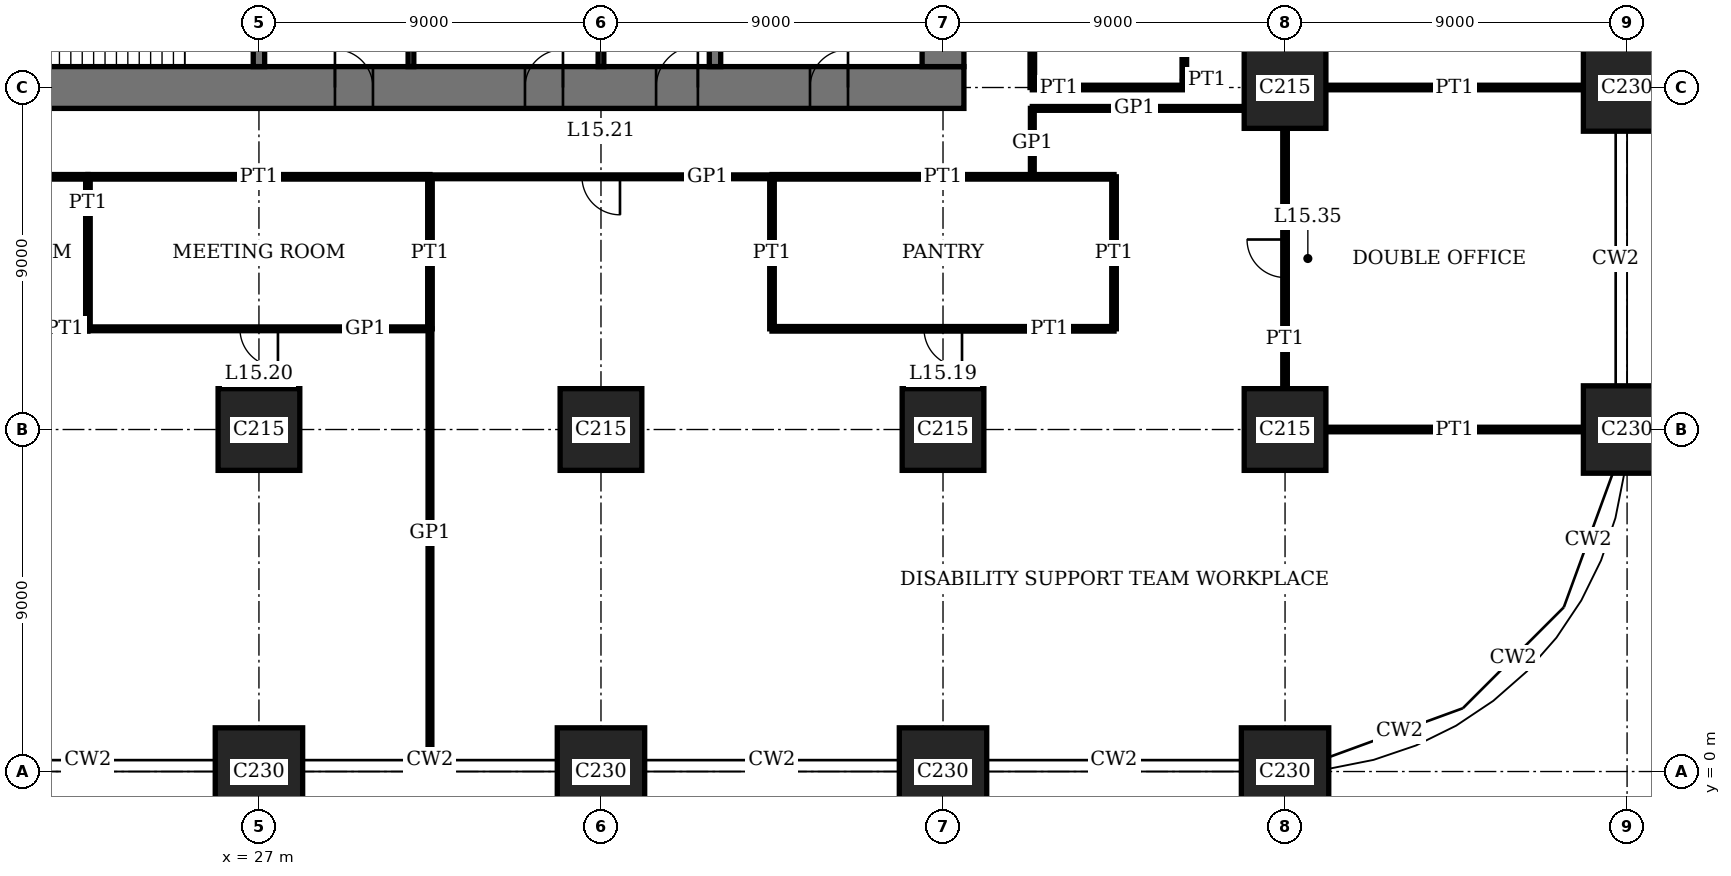
"""IFC4 building model, lengths in metres.
Left out: names, types, materials, properties, quantities, classifications, styles, units other than length and angle.
Written with IfcOpenShell. Run it as: python <this file> out.ifc"""

import sys

from ifc_helpers import new_model, si_unit, direction, frame, frame_2d, origin, origin_2d, place, context, subcontext, project, spatial, rectangle, extrude, element, fill, save


model = new_model("IFC4")
c1 = context("Model", 3, precision=1e-05, world=origin(), true_north=direction((0.0, 1.0)))
c2 = subcontext(c1, "Body", "Model", "MODEL_VIEW")
j1 = project(units=[si_unit("LENGTHUNIT", "METRE"), si_unit("PLANEANGLEUNIT", "RADIAN")], contexts=[c1])
p1 = place(None, origin())
s1 = spatial("IfcSite", under=j1, at=p1, CompositionType="ELEMENT")
p2 = place(p1, origin())
s2 = spatial("IfcBuilding", under=s1, at=p2, CompositionType="ELEMENT")
p3 = place(p2, frame((0.0, 0.0, 63.8)))
s3 = spatial("IfcBuildingStorey", under=s2, at=p3, CompositionType="ELEMENT", Elevation=63.8)
p4 = place(p3, frame((27.0, 0.0, 0.0), z_axis=(0.0, 0.0, 1.0), x_axis=(1.0, 0.0, 0.0)))
e1 = element("IfcColumn", 1, at=p4, inside=s3, PredefinedType="COLUMN", context=c2, shape_type="SweptSolid", body=[
    extrude(rectangle(XDim=2.3, YDim=2.3, at=origin_2d()), origin(), (0.0, 0.0, 1.0), 4.0),
])
p5 = place(p3, frame((27.0, 9.0, 0.0), z_axis=(0.0, 0.0, 1.0), x_axis=(1.0, 0.0, 0.0)))
e2 = element("IfcColumn", 2, at=p5, inside=s3, PredefinedType="COLUMN", context=c2, shape_type="SweptSolid", body=[
    extrude(rectangle(XDim=2.15, YDim=2.15, at=origin_2d()), origin(), (0.0, 0.0, 1.0), 4.0),
])
p6 = place(p3, frame((36.0, 0.0, 0.0), z_axis=(0.0, 0.0, 1.0), x_axis=(1.0, 0.0, 0.0)))
e3 = element("IfcColumn", 3, at=p6, inside=s3, PredefinedType="COLUMN", context=c2, shape_type="SweptSolid", body=[
    extrude(rectangle(XDim=2.3, YDim=2.3, at=origin_2d()), origin(), (0.0, 0.0, 1.0), 4.0),
])
p7 = place(p3, frame((36.0, 9.0, 0.0), z_axis=(0.0, 0.0, 1.0), x_axis=(1.0, 0.0, 0.0)))
e4 = element("IfcColumn", 4, at=p7, inside=s3, PredefinedType="COLUMN", context=c2, shape_type="SweptSolid", body=[
    extrude(rectangle(XDim=2.15, YDim=2.15, at=origin_2d()), origin(), (0.0, 0.0, 1.0), 4.0),
])
p8 = place(p3, frame((45.0, 0.0, 0.0), z_axis=(0.0, 0.0, 1.0), x_axis=(1.0, 0.0, 0.0)))
e5 = element("IfcColumn", 5, at=p8, inside=s3, PredefinedType="COLUMN", context=c2, shape_type="SweptSolid", body=[
    extrude(rectangle(XDim=2.3, YDim=2.3, at=origin_2d()), origin(), (0.0, 0.0, 1.0), 4.0),
])
p9 = place(p3, frame((45.0, 9.0, 0.0), z_axis=(0.0, 0.0, 1.0), x_axis=(1.0, 0.0, 0.0)))
e6 = element("IfcColumn", 6, at=p9, inside=s3, PredefinedType="COLUMN", context=c2, shape_type="SweptSolid", body=[
    extrude(rectangle(XDim=2.15, YDim=2.15, at=origin_2d()), origin(), (0.0, 0.0, 1.0), 4.0),
])
p10 = place(p3, frame((54.0, 0.0, 0.0), z_axis=(0.0, 0.0, 1.0), x_axis=(1.0, 0.0, 0.0)))
e7 = element("IfcColumn", 7, at=p10, inside=s3, PredefinedType="COLUMN", context=c2, shape_type="SweptSolid", body=[
    extrude(rectangle(XDim=2.3, YDim=2.3, at=origin_2d()), origin(), (0.0, 0.0, 1.0), 4.0),
])
for number, where, z_axis, x_axis in (
    (8, (54.0, 9.0, 0.0), (0.0, 0.0, 1.0), (1.0, 0.0, 0.0)),
    (9, (54.0, 18.0, 0.0), (0.0, 0.0, 1.0), (1.0, 0.0, 0.0)),
):
    element("IfcColumn", number, at=place(p3, frame(where, z_axis=z_axis, x_axis=x_axis)), inside=s3, PredefinedType="COLUMN", context=c2, shape_type="SweptSolid", body=[
        extrude(rectangle(XDim=2.15, YDim=2.15, at=origin_2d()), origin(), (0.0, 0.0, 1.0), 4.0),
    ])
for number, where, z_axis, x_axis in (
    (10, (63.0, 9.0, 0.0), (0.0, 0.0, 1.0), (1.0, 0.0, 0.0)),
    (11, (63.0, 18.0, 0.0), (0.0, 0.0, 1.0), (1.0, 0.0, 0.0)),
):
    element("IfcColumn", number, at=place(p3, frame(where, z_axis=z_axis, x_axis=x_axis)), inside=s3, PredefinedType="COLUMN", context=c2, shape_type="SweptSolid", body=[
        extrude(rectangle(XDim=2.3, YDim=2.3, at=origin_2d()), origin(), (0.0, 0.0, 1.0), 4.0),
    ])
p11 = place(p3, frame((17.45, 18.0, 0.0), z_axis=(0.0, 0.0, 1.0), x_axis=(1.0, 0.0, 0.0)))
e12 = element("IfcWall", 12, at=p11, inside=s3, PredefinedType="SHEAR", context=c2, shape_type="SweptSolid", body=[
    extrude(rectangle(XDim=28.1, YDim=1.1, at=frame_2d((14.05, 0.0))), origin(), (0.0, 0.0, 1.0), 4.0),
])
p12 = place(p11, frame((11.55, 0.0, 0.0)))
e13 = element("IfcOpeningElement", 13, at=p12, cuts=e12, PredefinedType="OPENING", context=c2, shape_type="SweptSolid", body=[
    extrude(rectangle(XDim=1.0, YDim=2.4, at=frame_2d((0.5, 1.2))), frame((0.0, 0.56, 0.0), z_axis=(0.0, -1.0, 0.0), x_axis=(1.0, 0.0, 0.0)), (0.0, 0.0, 1.0), 1.12),
])
p13 = place(p11, frame((16.55, 0.0, 0.0)))
e14 = element("IfcOpeningElement", 14, at=p13, cuts=e12, PredefinedType="OPENING", context=c2, shape_type="SweptSolid", body=[
    extrude(rectangle(XDim=1.0, YDim=2.4, at=frame_2d((0.5, 1.2))), frame((0.0, 0.56, 0.0), z_axis=(0.0, -1.0, 0.0), x_axis=(1.0, 0.0, 0.0)), (0.0, 0.0, 1.0), 1.12),
])
p14 = place(p11, frame((20.0, 0.0, 0.0)))
e15 = element("IfcOpeningElement", 15, at=p14, cuts=e12, PredefinedType="OPENING", context=c2, shape_type="SweptSolid", body=[
    extrude(rectangle(XDim=1.1, YDim=2.4, at=frame_2d((0.55, 1.2))), frame((0.0, 0.56, 0.0), z_axis=(0.0, -1.0, 0.0), x_axis=(1.0, 0.0, 0.0)), (0.0, 0.0, 1.0), 1.12),
])
p15 = place(p11, frame((24.05, 0.0, 0.0)))
e16 = element("IfcOpeningElement", 16, at=p15, cuts=e12, PredefinedType="OPENING", context=c2, shape_type="SweptSolid", body=[
    extrude(rectangle(XDim=1.0, YDim=2.4, at=frame_2d((0.5, 1.2))), frame((0.0, 0.56, 0.0), z_axis=(0.0, -1.0, 0.0), x_axis=(1.0, 0.0, 0.0)), (0.0, 0.0, 1.0), 1.12),
])
p16 = place(p3, frame((45.0, 18.55, 0.0), z_axis=(0.0, 0.0, 1.0), x_axis=(0.0, 1.0, 0.0)))
e17 = element("IfcWall", 17, at=p16, inside=s3, PredefinedType="SHEAR", context=c2, shape_type="SweptSolid", body=[
    extrude(rectangle(XDim=16.9, YDim=1.1, at=frame_2d((8.45, 0.0))), origin(), (0.0, 0.0, 1.0), 4.0),
])
p17 = place(p16, frame((8.45, 0.0, 0.0)))
e18 = element("IfcOpeningElement", 18, at=p17, cuts=e17, PredefinedType="OPENING", context=c2, shape_type="SweptSolid", body=[
    extrude(rectangle(XDim=1.8, YDim=2.4, at=frame_2d((0.9, 1.2))), frame((0.0, 0.56, 0.0), z_axis=(0.0, -1.0, 0.0), x_axis=(1.0, 0.0, 0.0)), (0.0, 0.0, 1.0), 1.12),
])
p18 = place(p3, frame((27.0, 18.55, 0.0), z_axis=(0.0, 0.0, 1.0), x_axis=(0.0, 1.0, 0.0)))
e19 = element("IfcWall", 19, at=p18, inside=s3, PredefinedType="SHEAR", context=c2, shape_type="SweptSolid", body=[
    extrude(rectangle(XDim=3.05, YDim=0.3, at=frame_2d((1.525, 0.0))), origin(), (0.0, 0.0, 1.0), 4.0),
])
p19 = place(p3, frame((39.0, 18.55, 0.0), z_axis=(0.0, 0.0, 1.0), x_axis=(0.0, 1.0, 0.0)))
e20 = element("IfcWall", 20, at=p19, inside=s3, PredefinedType="SHEAR", context=c2, shape_type="SweptSolid", body=[
    extrude(rectangle(XDim=5.9, YDim=0.3, at=frame_2d((2.95, 0.0))), origin(), (0.0, 0.0, 1.0), 4.0),
])
p20 = place(p3, frame((55.075, 9.0, 0.0), z_axis=(0.0, 0.0, 1.0), x_axis=(1.0, 0.0, 0.0)))
e21 = element("IfcWall", 21, at=p20, inside=s3, PredefinedType="PARTITIONING", context=c2, shape_type="SweptSolid", body=[
    extrude(rectangle(XDim=6.775, YDim=0.12, at=frame_2d((3.388, 0.0))), origin(), (0.0, 0.0, 1.0), 3.05),
])
p21 = place(p3, frame((18.0, 11.65, 0.0), z_axis=(0.0, 0.0, 1.0), x_axis=(1.0, 0.0, 0.0)))
e22 = element("IfcWall", 22, at=p21, inside=s3, PredefinedType="PARTITIONING", context=c2, shape_type="SweptSolid", body=[
    extrude(rectangle(XDim=4.5, YDim=0.12, at=frame_2d((2.25, 0.0))), origin(), (0.0, 0.0, 1.0), 3.75),
])
p22 = place(p21, frame((1.75, 0.0, 0.0)))
e23 = element("IfcOpeningElement", 23, at=p22, cuts=e22, PredefinedType="OPENING", context=c2, shape_type="SweptSolid", body=[
    extrude(rectangle(XDim=1.0, YDim=2.4, at=frame_2d((0.5, 1.2))), frame((0.0, 0.07, 0.0), z_axis=(0.0, -1.0, 0.0), x_axis=(1.0, 0.0, 0.0)), (0.0, 0.0, 1.0), 0.14),
])
p23 = place(p3, frame((40.5, 11.65, 0.0), z_axis=(0.0, 0.0, 1.0), x_axis=(1.0, 0.0, 0.0)))
e24 = element("IfcWall", 24, at=p23, inside=s3, PredefinedType="PARTITIONING", context=c2, shape_type="SweptSolid", body=[
    extrude(rectangle(XDim=9.0, YDim=0.12, at=frame_2d((4.5, 0.0))), origin(), (0.0, 0.0, 1.0), 3.75),
])
p24 = place(p23, frame((4.0, 0.0, 0.0)))
e25 = element("IfcOpeningElement", 25, at=p24, cuts=e24, PredefinedType="OPENING", context=c2, shape_type="SweptSolid", body=[
    extrude(rectangle(XDim=1.0, YDim=2.4, at=frame_2d((0.5, 1.2))), frame((0.0, 0.07, 0.0), z_axis=(0.0, -1.0, 0.0), x_axis=(1.0, 0.0, 0.0)), (0.0, 0.0, 1.0), 0.14),
])
p25 = place(p3, frame((22.5, 11.65, 0.0), z_axis=(0.0, 0.0, 1.0), x_axis=(1.0, 0.0, 0.0)))
e26 = element("IfcWall", 26, at=p25, inside=s3, PredefinedType="PARTITIONING", context=c2, shape_type="SweptSolid", body=[
    extrude(rectangle(XDim=9.0, YDim=0.1, at=frame_2d((4.5, 0.0))), origin(), (0.0, 0.0, 1.0), 3.75),
])
p26 = place(p25, frame((4.0, 0.0, 0.0)))
e27 = element("IfcOpeningElement", 27, at=p26, cuts=e26, PredefinedType="OPENING", context=c2, shape_type="SweptSolid", body=[
    extrude(rectangle(XDim=1.0, YDim=2.4, at=frame_2d((0.5, 1.2))), frame((0.0, 0.06, 0.0), z_axis=(0.0, -1.0, 0.0), x_axis=(1.0, 0.0, 0.0)), (0.0, 0.0, 1.0), 0.12),
])
p27 = place(p3, frame((18.0, 15.65, 0.0), z_axis=(0.0, 0.0, 1.0), x_axis=(1.0, 0.0, 0.0)))
e28 = element("IfcWall", 28, at=p27, inside=s3, PredefinedType="PARTITIONING", context=c2, shape_type="SweptSolid", body=[
    extrude(rectangle(XDim=4.5, YDim=0.12, at=frame_2d((2.25, 0.0))), origin(), (0.0, 0.0, 1.0), 3.75),
])
for number, where, z_axis, x_axis in (
    (29, (22.5, 15.65, 0.0), (0.0, 0.0, 1.0), (1.0, 0.0, 0.0)),
    (30, (40.5, 15.65, 0.0), (0.0, 0.0, 1.0), (1.0, 0.0, 0.0)),
):
    element("IfcWall", number, at=place(p3, frame(where, z_axis=z_axis, x_axis=x_axis)), inside=s3, PredefinedType="PARTITIONING", context=c2, shape_type="SweptSolid", body=[
        extrude(rectangle(XDim=9.0, YDim=0.12, at=frame_2d((4.5, 0.0))), origin(), (0.0, 0.0, 1.0), 3.75),
    ])
p28 = place(p3, frame((31.5, 15.65, 0.0), z_axis=(0.0, 0.0, 1.0), x_axis=(1.0, 0.0, 0.0)))
e31 = element("IfcWall", 31, at=p28, inside=s3, PredefinedType="PARTITIONING", context=c2, shape_type="SweptSolid", body=[
    extrude(rectangle(XDim=9.0, YDim=0.1, at=frame_2d((4.5, 0.0))), origin(), (0.0, 0.0, 1.0), 3.75),
])
p29 = place(p28, frame((4.0, 0.0, 0.0)))
e32 = element("IfcOpeningElement", 32, at=p29, cuts=e31, PredefinedType="OPENING", context=c2, shape_type="SweptSolid", body=[
    extrude(rectangle(XDim=1.0, YDim=2.4, at=frame_2d((0.5, 1.2))), frame((0.0, 0.06, 0.0), z_axis=(0.0, -1.0, 0.0), x_axis=(1.0, 0.0, 0.0)), (0.0, 0.0, 1.0), 0.12),
])
p30 = place(p3, frame((47.35, 17.45, 0.0), z_axis=(0.0, 0.0, 1.0), x_axis=(1.0, 0.0, 0.0)))
e33 = element("IfcWall", 33, at=p30, inside=s3, PredefinedType="PARTITIONING", context=c2, shape_type="SweptSolid", body=[
    extrude(rectangle(XDim=5.575, YDim=0.1, at=frame_2d((2.788, 0.0))), origin(), (0.0, 0.0, 1.0), 3.05),
])
p31 = place(p3, frame((47.35, 18.0, 0.0), z_axis=(0.0, 0.0, 1.0), x_axis=(1.0, 0.0, 0.0)))
e34 = element("IfcWall", 34, at=p31, inside=s3, PredefinedType="PARTITIONING", context=c2, shape_type="SweptSolid", body=[
    extrude(rectangle(XDim=4.0, YDim=0.12, at=frame_2d((2.0, 0.0))), origin(), (0.0, 0.0, 1.0), 3.05),
])
p32 = place(p3, frame((55.075, 18.0, 0.0), z_axis=(0.0, 0.0, 1.0), x_axis=(1.0, 0.0, 0.0)))
e35 = element("IfcWall", 35, at=p32, inside=s3, PredefinedType="PARTITIONING", context=c2, shape_type="SweptSolid", body=[
    extrude(rectangle(XDim=6.775, YDim=0.12, at=frame_2d((3.388, 0.0))), origin(), (0.0, 0.0, 1.0), 3.05),
])
for number, where, z_axis, x_axis in (
    (36, (22.5, 11.65, 0.0), (0.0, 0.0, 1.0), (0.0, 1.0, 0.0)),
    (37, (31.5, 11.65, 0.0), (0.0, 0.0, 1.0), (0.0, 1.0, 0.0)),
):
    element("IfcWall", number, at=place(p3, frame(where, z_axis=z_axis, x_axis=x_axis)), inside=s3, PredefinedType="PARTITIONING", context=c2, shape_type="SweptSolid", body=[
        extrude(rectangle(XDim=4.0, YDim=0.12, at=frame_2d((2.0, 0.0))), origin(), (0.0, 0.0, 1.0), 3.75),
    ])
p33 = place(p3, frame((31.5, 0.31, 0.0), z_axis=(0.0, 0.0, 1.0), x_axis=(0.0, 1.0, 0.0)))
e38 = element("IfcWall", 38, at=p33, inside=s3, PredefinedType="PARTITIONING", context=c2, shape_type="SweptSolid", body=[
    extrude(rectangle(XDim=11.34, YDim=0.1, at=frame_2d((5.67, 0.0))), origin(), (0.0, 0.0, 1.0), 3.75),
])
p34 = place(p3, frame((40.5, 11.65, 0.0), z_axis=(0.0, 0.0, 1.0), x_axis=(0.0, 1.0, 0.0)))
e39 = element("IfcWall", 39, at=p34, inside=s3, PredefinedType="PARTITIONING", context=c2, shape_type="SweptSolid", body=[
    extrude(rectangle(XDim=4.0, YDim=0.12, at=frame_2d((2.0, 0.0))), origin(), (0.0, 0.0, 1.0), 3.75),
])
p35 = place(p3, frame((47.35, 18.0, 0.0), z_axis=(0.0, 0.0, 1.0), x_axis=(0.0, 1.0, 0.0)))
e40 = element("IfcWall", 40, at=p35, inside=s3, PredefinedType="PARTITIONING", context=c2, shape_type="SweptSolid", body=[
    extrude(rectangle(XDim=4.5, YDim=0.12, at=frame_2d((2.25, 0.0))), origin(), (0.0, 0.0, 1.0), 3.75),
])
p36 = place(p3, frame((47.35, 15.65, 0.0), z_axis=(0.0, 0.0, 1.0), x_axis=(0.0, 1.0, 0.0)))
e41 = element("IfcWall", 41, at=p36, inside=s3, PredefinedType="PARTITIONING", context=c2, shape_type="SweptSolid", body=[
    extrude(rectangle(XDim=1.8, YDim=0.1, at=frame_2d((0.9, 0.0))), origin(), (0.0, 0.0, 1.0), 3.75),
])
p37 = place(p3, frame((49.5, 11.65, 0.0), z_axis=(0.0, 0.0, 1.0), x_axis=(0.0, 1.0, 0.0)))
e42 = element("IfcWall", 42, at=p37, inside=s3, PredefinedType="PARTITIONING", context=c2, shape_type="SweptSolid", body=[
    extrude(rectangle(XDim=4.0, YDim=0.12, at=frame_2d((2.0, 0.0))), origin(), (0.0, 0.0, 1.0), 3.75),
])
p38 = place(p3, frame((51.35, 18.0, 0.0), z_axis=(0.0, 0.0, 1.0), x_axis=(0.0, 1.0, 0.0)))
e43 = element("IfcWall", 43, at=p38, inside=s3, PredefinedType="PARTITIONING", context=c2, shape_type="SweptSolid", body=[
    extrude(rectangle(XDim=4.5, YDim=0.12, at=frame_2d((2.25, 0.0))), origin(), (0.0, 0.0, 1.0), 3.75),
])
p39 = place(p38, frame((1.75, 0.0, 0.0)))
e44 = element("IfcOpeningElement", 44, at=p39, cuts=e43, PredefinedType="OPENING", context=c2, shape_type="SweptSolid", body=[
    extrude(rectangle(XDim=1.0, YDim=2.4, at=frame_2d((0.5, 1.2))), frame((0.0, 0.07, 0.0), z_axis=(0.0, -1.0, 0.0), x_axis=(1.0, 0.0, 0.0)), (0.0, 0.0, 1.0), 0.14),
])
p40 = place(p3, frame((54.0, 10.075, 0.0), z_axis=(0.0, 0.0, 1.0), x_axis=(0.0, 1.0, 0.0)))
e45 = element("IfcWall", 45, at=p40, inside=s3, PredefinedType="PARTITIONING", context=c2, shape_type="SweptSolid", body=[
    extrude(rectangle(XDim=6.85, YDim=0.12, at=frame_2d((3.425, 0.0))), origin(), (0.0, 0.0, 1.0), 3.05),
])
p41 = place(p40, frame((2.925, 0.0, 0.0)))
e46 = element("IfcOpeningElement", 46, at=p41, cuts=e45, PredefinedType="OPENING", context=c2, shape_type="SweptSolid", body=[
    extrude(rectangle(XDim=1.0, YDim=2.4, at=frame_2d((0.5, 1.2))), frame((0.0, 0.07, 0.0), z_axis=(0.0, -1.0, 0.0), x_axis=(1.0, 0.0, 0.0)), (0.0, 0.0, 1.0), 0.14),
])
for number, where, z_axis, x_axis in (
    (47, (31.0, 18.55, 0.0), (0.0, 0.0, 1.0), (0.0, 1.0, 0.0)),
    (48, (36.0, 18.55, 0.0), (0.0, 0.0, 1.0), (0.0, 1.0, 0.0)),
):
    element("IfcWall", number, at=place(p3, frame(where, z_axis=z_axis, x_axis=x_axis)), inside=s3, PredefinedType="PARTITIONING", context=c2, shape_type="SweptSolid", body=[
        extrude(rectangle(XDim=2.9, YDim=0.15, at=frame_2d((1.45, 0.0))), origin(), (0.0, 0.0, 1.0), 3.75),
    ])
p42 = place(p12, origin())
e49 = element("IfcDoor", 49, at=p42, inside=s3, OperationType="SINGLE_SWING_RIGHT", PredefinedType="DOOR", context=c2, shape_type="SweptSolid", body=[
    extrude(rectangle(XDim=1.0, YDim=2.4, at=frame_2d((0.5, 1.2))), frame((0.0, 0.025, 0.0), z_axis=(0.0, -1.0, 0.0), x_axis=(1.0, 0.0, 0.0)), (0.0, 0.0, 1.0), 0.05),
    extrude(rectangle(XDim=0.04, YDim=2.4, at=frame_2d((0.02, 1.2))), frame((0.0, 0.4, 0.0), z_axis=(0.0, -1.0, 0.0), x_axis=(1.0, 0.0, 0.0)), (0.0, 0.0, 1.0), 0.8),
    extrude(rectangle(XDim=0.04, YDim=2.4, at=frame_2d((0.98, 1.2))), frame((0.0, 0.4, 0.0), z_axis=(0.0, -1.0, 0.0), x_axis=(1.0, 0.0, 0.0)), (0.0, 0.0, 1.0), 0.8),
    extrude(rectangle(XDim=1.0, YDim=0.04, at=frame_2d((0.5, 2.38))), frame((0.0, 0.4, 0.0), z_axis=(0.0, -1.0, 0.0), x_axis=(1.0, 0.0, 0.0)), (0.0, 0.0, 1.0), 0.8),
])
fill(e13, e49)
p43 = place(p13, origin())
e50 = element("IfcDoor", 50, at=p43, inside=s3, OperationType="SINGLE_SWING_LEFT", PredefinedType="DOOR", context=c2, shape_type="SweptSolid", body=[
    extrude(rectangle(XDim=1.0, YDim=2.4, at=frame_2d((0.5, 1.2))), frame((0.0, 0.025, 0.0), z_axis=(0.0, -1.0, 0.0), x_axis=(1.0, 0.0, 0.0)), (0.0, 0.0, 1.0), 0.05),
    extrude(rectangle(XDim=0.04, YDim=2.4, at=frame_2d((0.02, 1.2))), frame((0.0, 0.4, 0.0), z_axis=(0.0, -1.0, 0.0), x_axis=(1.0, 0.0, 0.0)), (0.0, 0.0, 1.0), 0.8),
    extrude(rectangle(XDim=0.04, YDim=2.4, at=frame_2d((0.98, 1.2))), frame((0.0, 0.4, 0.0), z_axis=(0.0, -1.0, 0.0), x_axis=(1.0, 0.0, 0.0)), (0.0, 0.0, 1.0), 0.8),
    extrude(rectangle(XDim=1.0, YDim=0.04, at=frame_2d((0.5, 2.38))), frame((0.0, 0.4, 0.0), z_axis=(0.0, -1.0, 0.0), x_axis=(1.0, 0.0, 0.0)), (0.0, 0.0, 1.0), 0.8),
])
fill(e14, e50)
p44 = place(p14, origin())
e51 = element("IfcDoor", 51, at=p44, inside=s3, OperationType="SINGLE_SWING_LEFT", PredefinedType="DOOR", context=c2, shape_type="SweptSolid", body=[
    extrude(rectangle(XDim=1.1, YDim=2.4, at=frame_2d((0.55, 1.2))), frame((0.0, 0.025, 0.0), z_axis=(0.0, -1.0, 0.0), x_axis=(1.0, 0.0, 0.0)), (0.0, 0.0, 1.0), 0.05),
    extrude(rectangle(XDim=0.04, YDim=2.4, at=frame_2d((0.02, 1.2))), frame((0.0, 0.44, 0.0), z_axis=(0.0, -1.0, 0.0), x_axis=(1.0, 0.0, 0.0)), (0.0, 0.0, 1.0), 0.88),
    extrude(rectangle(XDim=0.04, YDim=2.4, at=frame_2d((1.08, 1.2))), frame((0.0, 0.44, 0.0), z_axis=(0.0, -1.0, 0.0), x_axis=(1.0, 0.0, 0.0)), (0.0, 0.0, 1.0), 0.88),
    extrude(rectangle(XDim=1.1, YDim=0.04, at=frame_2d((0.55, 2.38))), frame((0.0, 0.44, 0.0), z_axis=(0.0, -1.0, 0.0), x_axis=(1.0, 0.0, 0.0)), (0.0, 0.0, 1.0), 0.88),
])
fill(e15, e51)
p45 = place(p15, origin())
e52 = element("IfcDoor", 52, at=p45, inside=s3, OperationType="SINGLE_SWING_LEFT", PredefinedType="DOOR", context=c2, shape_type="SweptSolid", body=[
    extrude(rectangle(XDim=1.0, YDim=2.4, at=frame_2d((0.5, 1.2))), frame((0.0, 0.025, 0.0), z_axis=(0.0, -1.0, 0.0), x_axis=(1.0, 0.0, 0.0)), (0.0, 0.0, 1.0), 0.05),
    extrude(rectangle(XDim=0.04, YDim=2.4, at=frame_2d((0.02, 1.2))), frame((0.0, 0.4, 0.0), z_axis=(0.0, -1.0, 0.0), x_axis=(1.0, 0.0, 0.0)), (0.0, 0.0, 1.0), 0.8),
    extrude(rectangle(XDim=0.04, YDim=2.4, at=frame_2d((0.98, 1.2))), frame((0.0, 0.4, 0.0), z_axis=(0.0, -1.0, 0.0), x_axis=(1.0, 0.0, 0.0)), (0.0, 0.0, 1.0), 0.8),
    extrude(rectangle(XDim=1.0, YDim=0.04, at=frame_2d((0.5, 2.38))), frame((0.0, 0.4, 0.0), z_axis=(0.0, -1.0, 0.0), x_axis=(1.0, 0.0, 0.0)), (0.0, 0.0, 1.0), 0.8),
])
fill(e16, e52)
p46 = place(p24, origin())
e53 = element("IfcDoor", 53, at=p46, inside=s3, OperationType="SINGLE_SWING_RIGHT", PredefinedType="DOOR", context=c2, shape_type="SweptSolid", body=[
    extrude(rectangle(XDim=1.0, YDim=2.4, at=frame_2d((0.5, 1.2))), frame((0.0, 0.025, 0.0), z_axis=(0.0, -1.0, 0.0), x_axis=(1.0, 0.0, 0.0)), (0.0, 0.0, 1.0), 0.05),
])
fill(e25, e53)
p47 = place(p26, origin())
e54 = element("IfcDoor", 54, at=p47, inside=s3, OperationType="SINGLE_SWING_RIGHT", PredefinedType="DOOR", context=c2, shape_type="SweptSolid", body=[
    extrude(rectangle(XDim=1.0, YDim=2.4, at=frame_2d((0.5, 1.2))), frame((0.0, 0.02, 0.0), z_axis=(0.0, -1.0, 0.0), x_axis=(1.0, 0.0, 0.0)), (0.0, 0.0, 1.0), 0.04),
])
fill(e27, e54)
p48 = place(p29, origin())
e55 = element("IfcDoor", 55, at=p48, inside=s3, OperationType="SINGLE_SWING_RIGHT", PredefinedType="DOOR", context=c2, shape_type="SweptSolid", body=[
    extrude(rectangle(XDim=1.0, YDim=2.4, at=frame_2d((0.5, 1.2))), frame((0.0, 0.02, 0.0), z_axis=(0.0, -1.0, 0.0), x_axis=(1.0, 0.0, 0.0)), (0.0, 0.0, 1.0), 0.04),
])
fill(e32, e55)
p49 = place(p41, origin())
e56 = element("IfcDoor", 56, at=p49, inside=s3, OperationType="SINGLE_SWING_LEFT", PredefinedType="DOOR", context=c2, shape_type="SweptSolid", body=[
    extrude(rectangle(XDim=1.0, YDim=2.4, at=frame_2d((0.5, 1.2))), frame((0.0, 0.025, 0.0), z_axis=(0.0, -1.0, 0.0), x_axis=(1.0, 0.0, 0.0)), (0.0, 0.0, 1.0), 0.05),
])
fill(e46, e56)
save(model, sys.argv[1])
